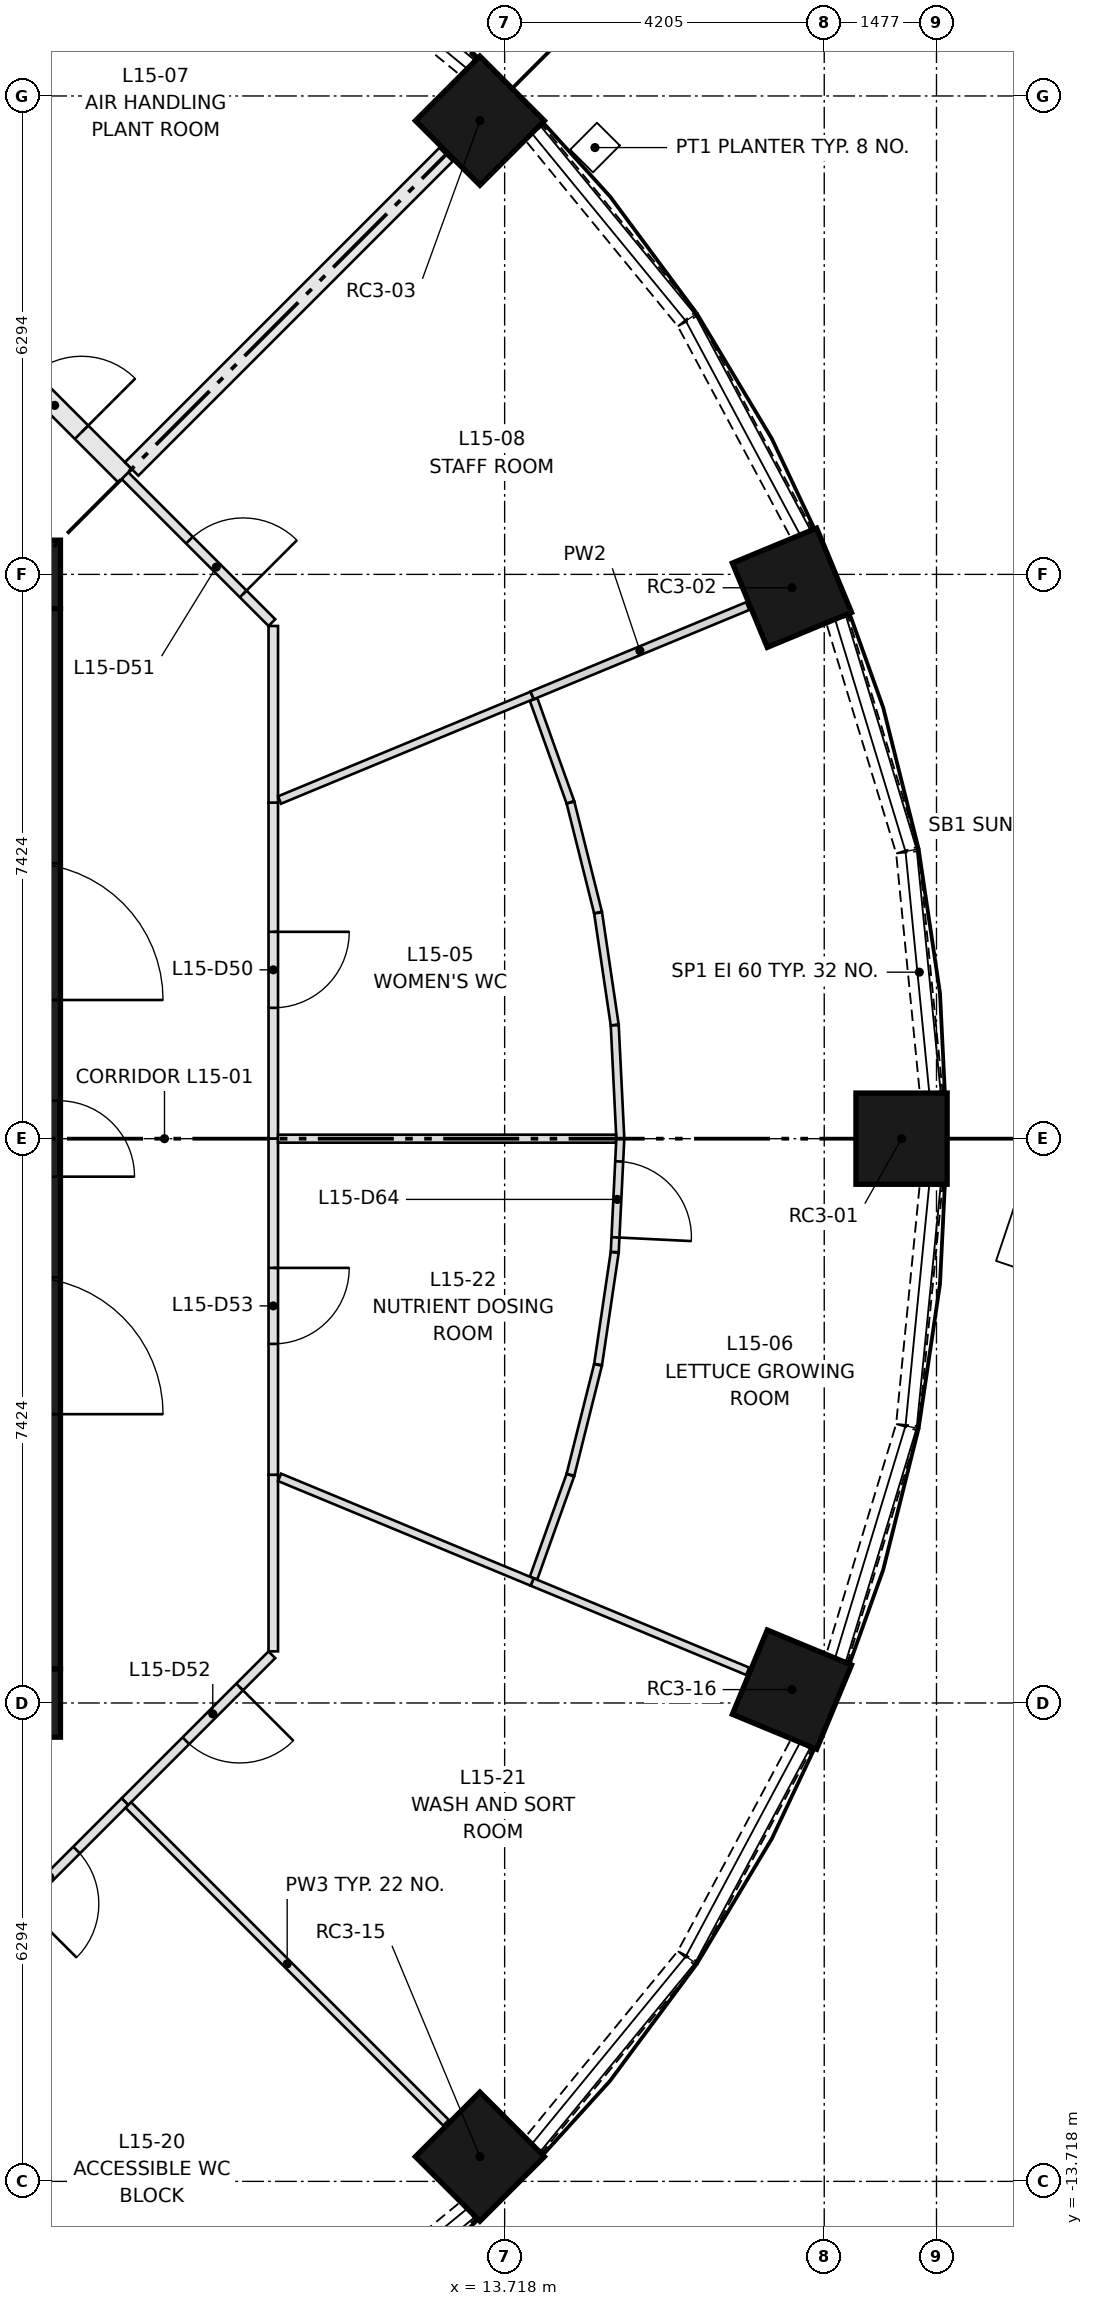
"""IFC4 building model, lengths in metres.
Left out: names, types, materials, properties, quantities, classifications, styles, units other than length and angle.
Written with IfcOpenShell. Run it as: python <this file> out.ifc"""

import sys

from ifc_helpers import new_model, si_unit, direction, frame, frame_2d, origin, origin_2d, place, context, subcontext, project, spatial, rectangle, extrude, element, fill, save


model = new_model("IFC4")
c1 = context("Model", 3, precision=1e-05, world=origin(), true_north=direction((0.0, 1.0)))
c2 = subcontext(c1, "Body", "Model", "MODEL_VIEW")
j1 = project(units=[si_unit("LENGTHUNIT", "METRE"), si_unit("PLANEANGLEUNIT", "RADIAN")], contexts=[c1])
p1 = place(None, origin())
s1 = spatial("IfcSite", under=j1, at=p1, CompositionType="ELEMENT")
p2 = place(p1, origin())
s2 = spatial("IfcBuilding", under=s1, at=p2, CompositionType="ELEMENT")
p3 = place(p2, frame((0.0, 0.0, 59.05)))
s3 = spatial("IfcBuildingStorey", under=s2, at=p3, CompositionType="ELEMENT", Elevation=59.05)
for number, where, z_axis, x_axis in (
    (1, (18.94, 0.0, 0.0), (0.0, 0.0, 1.0), (1.0, 0.0, 0.0)),
    (2, (17.498, 7.248, 0.0), (0.0, 0.0, 1.0), (0.924, 0.383, 0.0)),
    (3, (13.393, 13.393, 0.0), (0.0, 0.0, 1.0), (0.707, 0.707, 0.0)),
    (4, (13.393, -13.393, 0.0), (0.0, 0.0, 1.0), (0.707, -0.707, 0.0)),
    (5, (17.498, -7.248, 0.0), (0.0, 0.0, 1.0), (0.924, -0.383, 0.0)),
):
    element("IfcColumn", number, at=place(p3, frame(where, z_axis=z_axis, x_axis=x_axis)), inside=s3, PredefinedType="COLUMN", context=c2, shape_type="SweptSolid", body=[
        extrude(rectangle(XDim=1.2, YDim=1.2, at=origin_2d()), origin(), (0.0, 0.0, 1.0), 3.65),
    ])
for number, where, z_axis, x_axis in (
    (6, (-7.874, -7.424, 0.0), (0.0, 0.0, 1.0), (1.0, 0.0, 0.0)),
    (7, (-7.874, 7.424, 0.0), (0.0, 0.0, 1.0), (1.0, 0.0, 0.0)),
):
    element("IfcWall", number, at=place(p3, frame(where, z_axis=z_axis, x_axis=x_axis)), inside=s3, PredefinedType="SHEAR", context=c2, shape_type="SweptSolid", body=[
        extrude(rectangle(XDim=15.748, YDim=0.9, at=frame_2d((7.874, 0.0))), origin(), (0.0, 0.0, 1.0), 3.65),
    ])
p4 = place(p3, frame((7.424, -6.974, 0.0), z_axis=(0.0, 0.0, 1.0), x_axis=(0.0, 1.0, 0.0)))
e8 = element("IfcWall", 8, at=p4, inside=s3, PredefinedType="SHEAR", context=c2, shape_type="SweptSolid", body=[
    extrude(rectangle(XDim=13.948, YDim=0.9, at=frame_2d((6.974, 0.0))), origin(), (0.0, 0.0, 1.0), 3.65),
])
p5 = place(p4, frame((6.474, 0.0, 0.0)))
e9 = element("IfcOpeningElement", 9, at=p5, cuts=e8, PredefinedType="OPENING", context=c2, shape_type="SweptSolid", body=[
    extrude(rectangle(XDim=1.0, YDim=2.1, at=frame_2d((0.5, 1.05))), frame((0.0, 0.46, 0.0), z_axis=(0.0, -1.0, 0.0), x_axis=(1.0, 0.0, 0.0)), (0.0, 0.0, 1.0), 0.92),
])
p6 = place(p4, frame((3.35, 0.0, 0.0)))
e10 = element("IfcOpeningElement", 10, at=p6, cuts=e8, PredefinedType="OPENING", context=c2, shape_type="SweptSolid", body=[
    extrude(rectangle(XDim=1.8, YDim=2.1, at=frame_2d((0.9, 1.05))), frame((0.0, 0.46, 0.0), z_axis=(0.0, -1.0, 0.0), x_axis=(1.0, 0.0, 0.0)), (0.0, 0.0, 1.0), 0.92),
])
p7 = place(p4, frame((8.799, 0.0, 0.0)))
e11 = element("IfcOpeningElement", 11, at=p7, cuts=e8, PredefinedType="OPENING", context=c2, shape_type="SweptSolid", body=[
    extrude(rectangle(XDim=1.8, YDim=2.1, at=frame_2d((0.9, 1.05))), frame((0.0, 0.46, 0.0), z_axis=(0.0, -1.0, 0.0), x_axis=(1.0, 0.0, 0.0)), (0.0, 0.0, 1.0), 0.92),
])
p8 = place(p3, frame((19.33, 0.613, 0.0), z_axis=(0.0, 0.0, 1.0), x_axis=(-0.098100807709, 0.995176482603, 0.0)))
e12 = element("IfcWall", 12, at=p8, inside=s3, PredefinedType="SOLIDWALL", context=c2, shape_type="SweptSolid", body=[
    extrude(rectangle(XDim=3.171, YDim=0.3, at=frame_2d((1.585, 0.0))), origin(), (0.0, 0.0, 1.0), 0.9),
])
p9 = place(p3, frame((19.013, 3.797, 0.0), z_axis=(0.0, 0.0, 1.0), x_axis=(-0.290456409527, 0.956888224489, 0.0)))
e13 = element("IfcWall", 13, at=p9, inside=s3, PredefinedType="SOLIDWALL", context=c2, shape_type="SweptSolid", body=[
    extrude(rectangle(XDim=3.169, YDim=0.3, at=frame_2d((1.584, 0.0))), origin(), (0.0, 0.0, 1.0), 0.9),
])
p10 = place(p3, frame((17.623, 7.963, 0.0), z_axis=(0.0, 0.0, 1.0), x_axis=(-0.47123575379, 0.882007292685, 0.0)))
e14 = element("IfcWall", 14, at=p10, inside=s3, PredefinedType="SOLIDWALL", context=c2, shape_type="SweptSolid", body=[
    extrude(rectangle(XDim=3.17, YDim=0.3, at=frame_2d((1.585, 0.0))), origin(), (0.0, 0.0, 1.0), 0.9),
])
for number, where, z_axis, x_axis in (
    (15, (16.113, 10.784, 0.0), (0.0, 0.0, 1.0), (-0.634, 0.773, 0.0)),
    (16, (13.234, 14.103, 0.0), (0.0, 0.0, 1.0), (-0.773, 0.634, 0.0)),
    (17, (10.784, -16.113, 0.0), (0.0, 0.0, 1.0), (0.773, 0.634, 0.0)),
    (18, (14.103, -13.234, 0.0), (0.0, 0.0, 1.0), (0.634, 0.773, 0.0)),
):
    element("IfcWall", number, at=place(p3, frame(where, z_axis=z_axis, x_axis=x_axis)), inside=s3, PredefinedType="SOLIDWALL", context=c2, shape_type="SweptSolid", body=[
        extrude(rectangle(XDim=3.169, YDim=0.3, at=frame_2d((1.585, 0.0))), origin(), (0.0, 0.0, 1.0), 0.9),
    ])
p11 = place(p3, frame((16.129, -10.759, 0.0), z_axis=(0.0, 0.0, 1.0), x_axis=(0.47123575379, 0.882007292685, 0.0)))
e19 = element("IfcWall", 19, at=p11, inside=s3, PredefinedType="SOLIDWALL", context=c2, shape_type="SweptSolid", body=[
    extrude(rectangle(XDim=3.17, YDim=0.3, at=frame_2d((1.585, 0.0))), origin(), (0.0, 0.0, 1.0), 0.9),
])
p12 = place(p3, frame((18.092, -6.83, 0.0), z_axis=(0.0, 0.0, 1.0), x_axis=(0.290456409527, 0.956888224489, 0.0)))
e20 = element("IfcWall", 20, at=p12, inside=s3, PredefinedType="SOLIDWALL", context=c2, shape_type="SweptSolid", body=[
    extrude(rectangle(XDim=3.169, YDim=0.3, at=frame_2d((1.584, 0.0))), origin(), (0.0, 0.0, 1.0), 0.9),
])
p13 = place(p3, frame((19.019, -3.768, 0.0), z_axis=(0.0, 0.0, 1.0), x_axis=(0.098100807709, 0.995176482603, 0.0)))
e21 = element("IfcWall", 21, at=p13, inside=s3, PredefinedType="SOLIDWALL", context=c2, shape_type="SweptSolid", body=[
    extrude(rectangle(XDim=3.171, YDim=0.3, at=frame_2d((1.585, 0.0))), origin(), (0.0, 0.0, 1.0), 0.9),
])
p14 = place(p3, frame((10.674, 4.421, 0.0), z_axis=(0.0, 0.0, 1.0), x_axis=(0.0, -1.0, 0.0)))
e22 = element("IfcWall", 22, at=p14, inside=s3, PredefinedType="PARTITIONING", context=c2, shape_type="SweptSolid", body=[
    extrude(rectangle(XDim=4.421, YDim=0.125, at=frame_2d((2.211, 0.0))), origin(), (0.0, 0.0, 1.0), 3.3),
])
p15 = place(p14, frame((1.7, 0.0, 0.0)))
e23 = element("IfcOpeningElement", 23, at=p15, cuts=e22, PredefinedType="OPENING", context=c2, shape_type="SweptSolid", body=[
    extrude(rectangle(XDim=1.0, YDim=2.1, at=frame_2d((0.5, 1.05))), frame((0.0, 0.073, 0.0), z_axis=(0.0, -1.0, 0.0), x_axis=(1.0, 0.0, 0.0)), (0.0, 0.0, 1.0), 0.145),
])
p16 = place(p3, frame((8.722, 8.722, 0.0), z_axis=(0.0, 0.0, 1.0), x_axis=(0.707151428813, -0.707062130741, 0.0)))
e24 = element("IfcWall", 24, at=p16, inside=s3, PredefinedType="PARTITIONING", context=c2, shape_type="SweptSolid", body=[
    extrude(rectangle(XDim=2.734, YDim=0.125, at=frame_2d((1.367, 0.0))), origin(), (0.0, 0.0, 1.0), 3.3),
])
p17 = place(p16, frame((1.2, 0.0, 0.0)))
e25 = element("IfcOpeningElement", 25, at=p17, cuts=e24, PredefinedType="OPENING", context=c2, shape_type="SweptSolid", body=[
    extrude(rectangle(XDim=1.0, YDim=2.1, at=frame_2d((0.5, 1.05))), frame((0.0, 0.073, 0.0), z_axis=(0.0, -1.0, 0.0), x_axis=(1.0, 0.0, 0.0)), (0.0, 0.0, 1.0), 0.145),
])
p18 = place(p3, frame((10.674, 6.745, 0.0), z_axis=(0.0, 0.0, 1.0), x_axis=(0.0, -1.0, 0.0)))
e26 = element("IfcWall", 26, at=p18, inside=s3, PredefinedType="PARTITIONING", context=c2, shape_type="SweptSolid", body=[
    extrude(rectangle(XDim=2.324, YDim=0.125, at=frame_2d((1.162, 0.0))), origin(), (0.0, 0.0, 1.0), 3.3),
])
p19 = place(p3, frame((10.656, -6.789, 0.0), z_axis=(0.0, 0.0, 1.0), x_axis=(-0.707151428813, -0.707062130741, 0.0)))
e27 = element("IfcWall", 27, at=p19, inside=s3, PredefinedType="PARTITIONING", context=c2, shape_type="SweptSolid", body=[
    extrude(rectangle(XDim=2.734, YDim=0.125, at=frame_2d((1.367, 0.0))), origin(), (0.0, 0.0, 1.0), 3.3),
])
p20 = place(p19, frame((0.6, 0.0, 0.0)))
e28 = element("IfcOpeningElement", 28, at=p20, cuts=e27, PredefinedType="OPENING", context=c2, shape_type="SweptSolid", body=[
    extrude(rectangle(XDim=1.0, YDim=2.1, at=frame_2d((0.5, 1.05))), frame((0.0, 0.073, 0.0), z_axis=(0.0, -1.0, 0.0), x_axis=(1.0, 0.0, 0.0)), (0.0, 0.0, 1.0), 0.145),
])
p21 = place(p3, frame((10.674, -4.421, 0.0), z_axis=(0.0, 0.0, 1.0), x_axis=(0.0, -1.0, 0.0)))
e29 = element("IfcWall", 29, at=p21, inside=s3, PredefinedType="PARTITIONING", context=c2, shape_type="SweptSolid", body=[
    extrude(rectangle(XDim=2.324, YDim=0.125, at=frame_2d((1.162, 0.0))), origin(), (0.0, 0.0, 1.0), 3.3),
])
p22 = place(p3, frame((10.674, 0.0, 0.0), z_axis=(0.0, 0.0, 1.0), x_axis=(0.0, -1.0, 0.0)))
e30 = element("IfcWall", 30, at=p22, inside=s3, PredefinedType="PARTITIONING", context=c2, shape_type="SweptSolid", body=[
    extrude(rectangle(XDim=4.421, YDim=0.125, at=frame_2d((2.211, 0.0))), origin(), (0.0, 0.0, 1.0), 3.3),
])
p23 = place(p22, frame((1.7, 0.0, 0.0)))
e31 = element("IfcOpeningElement", 31, at=p23, cuts=e30, PredefinedType="OPENING", context=c2, shape_type="SweptSolid", body=[
    extrude(rectangle(XDim=1.0, YDim=2.1, at=frame_2d((0.5, 1.05))), frame((0.0, 0.073, 0.0), z_axis=(0.0, -1.0, 0.0), x_axis=(1.0, 0.0, 0.0)), (0.0, 0.0, 1.0), 0.145),
])
p24 = place(p3, frame((6.808, 10.637, 0.0), z_axis=(0.0, 0.0, 1.0), x_axis=(0.707061703777, -0.707151855722, 0.0)))
e32 = element("IfcWall", 32, at=p24, inside=s3, PredefinedType="PARTITIONING", context=c2, shape_type="SweptSolid", body=[
    extrude(rectangle(XDim=2.708, YDim=0.25, at=frame_2d((1.354, 0.0))), origin(), (0.0, 0.0, 1.0), 3.3),
])
p25 = place(p24, frame((0.9, 0.0, 0.0)))
e33 = element("IfcOpeningElement", 33, at=p25, cuts=e32, PredefinedType="OPENING", context=c2, shape_type="SweptSolid", body=[
    extrude(rectangle(XDim=1.0, YDim=2.1, at=frame_2d((0.5, 1.05))), frame((0.0, 0.135, 0.0), z_axis=(0.0, -1.0, 0.0), x_axis=(1.0, 0.0, 0.0)), (0.0, 0.0, 1.0), 0.27),
])
p26 = place(p3, frame((8.722, -8.722, 0.0), z_axis=(0.0, 0.0, 1.0), x_axis=(-0.707062130741, -0.707151428813, 0.0)))
e34 = element("IfcWall", 34, at=p26, inside=s3, PredefinedType="PARTITIONING", context=c2, shape_type="SweptSolid", body=[
    extrude(rectangle(XDim=2.734, YDim=0.125, at=frame_2d((1.367, 0.0))), origin(), (0.0, 0.0, 1.0), 3.3),
])
p27 = place(p26, frame((0.9, 0.0, 0.0)))
e35 = element("IfcOpeningElement", 35, at=p27, cuts=e34, PredefinedType="OPENING", context=c2, shape_type="SweptSolid", body=[
    extrude(rectangle(XDim=1.0, YDim=2.1, at=frame_2d((0.5, 1.05))), frame((0.0, 0.073, 0.0), z_axis=(0.0, -1.0, 0.0), x_axis=(1.0, 0.0, 0.0)), (0.0, 0.0, 1.0), 0.145),
])
p28 = place(p3, frame((14.099, 5.778, 0.0), z_axis=(0.0, 0.0, 1.0), x_axis=(0.336918127064, -0.941533948222, 0.0)))
e36 = element("IfcWall", 36, at=p28, inside=s3, PredefinedType="PARTITIONING", context=c2, shape_type="SweptSolid", body=[
    extrude(rectangle(XDim=1.436, YDim=0.105, at=frame_2d((0.718, 0.0))), origin(), (0.0, 0.0, 1.0), 3.3),
])
for number, where, z_axis, x_axis in (
    (37, (14.584, 4.421, 0.0), (0.0, 0.0, 1.0), (0.243, -0.97, 0.0)),
    (38, (14.948, 2.971, 0.0), (0.0, 0.0, 1.0), (0.147, -0.989, 0.0)),
):
    element("IfcWall", number, at=place(p3, frame(where, z_axis=z_axis, x_axis=x_axis)), inside=s3, PredefinedType="PARTITIONING", context=c2, shape_type="SweptSolid", body=[
        extrude(rectangle(XDim=1.49, YDim=0.105, at=frame_2d((0.745, 0.0))), origin(), (0.0, 0.0, 1.0), 3.3),
    ])
p29 = place(p3, frame((15.167, 1.491, 0.0), z_axis=(0.0, 0.0, 1.0), x_axis=(0.049056777577, -0.998795991469, 0.0)))
e39 = element("IfcWall", 39, at=p29, inside=s3, PredefinedType="PARTITIONING", context=c2, shape_type="SweptSolid", body=[
    extrude(rectangle(XDim=1.493, YDim=0.105, at=frame_2d((0.747, 0.0))), origin(), (0.0, 0.0, 1.0), 3.3),
])
p30 = place(p3, frame((10.757, 4.456, 0.0), z_axis=(0.0, 0.0, 1.0), x_axis=(0.923886131731, 0.382667500051, 0.0)))
e40 = element("IfcWall", 40, at=p30, inside=s3, PredefinedType="PARTITIONING", context=c2, shape_type="SweptSolid", body=[
    extrude(rectangle(XDim=3.597, YDim=0.105, at=frame_2d((1.798, 0.0))), origin(), (0.0, 0.0, 1.0), 3.3),
])
p31 = place(p3, frame((15.185, 0.0, 0.0), z_axis=(0.0, 0.0, 1.0), x_axis=(-1.0, 0.0, 0.0)))
e41 = element("IfcWall", 41, at=p31, inside=s3, PredefinedType="PARTITIONING", context=c2, shape_type="SweptSolid", body=[
    extrude(rectangle(XDim=4.448, YDim=0.105, at=frame_2d((2.224, 0.0))), origin(), (0.0, 0.0, 1.0), 3.3),
])
p32 = place(p3, frame((14.08, 5.832, 0.0), z_axis=(0.0, 0.0, 1.0), x_axis=(0.923860783753, 0.382728692736, 0.0)))
e42 = element("IfcWall", 42, at=p32, inside=s3, PredefinedType="PARTITIONING", context=c2, shape_type="SweptSolid", body=[
    extrude(rectangle(XDim=3.07, YDim=0.11, at=frame_2d((1.535, 0.0))), origin(), (0.0, 0.0, 1.0), 3.3),
])
p33 = place(p3, frame((16.916, -7.007, 0.0), z_axis=(0.0, 0.0, 1.0), x_axis=(-0.923860783753, 0.382728692736, 0.0)))
e43 = element("IfcWall", 43, at=p33, inside=s3, PredefinedType="PARTITIONING", context=c2, shape_type="SweptSolid", body=[
    extrude(rectangle(XDim=3.07, YDim=0.105, at=frame_2d((1.535, 0.0))), origin(), (0.0, 0.0, 1.0), 3.3),
])
p34 = place(p3, frame((14.098, -5.78, 0.0), z_axis=(0.0, 0.0, 1.0), x_axis=(0.336981574949, 0.941511241646, 0.0)))
e44 = element("IfcWall", 44, at=p34, inside=s3, PredefinedType="PARTITIONING", context=c2, shape_type="SweptSolid", body=[
    extrude(rectangle(XDim=1.438, YDim=0.105, at=frame_2d((0.719, 0.0))), origin(), (0.0, 0.0, 1.0), 3.3),
])
for number, where, z_axis, x_axis in (
    (45, (14.584, -4.421, 0.0), (0.0, 0.0, 1.0), (0.243, 0.97, 0.0)),
    (46, (14.948, -2.971, 0.0), (0.0, 0.0, 1.0), (0.147, 0.989, 0.0)),
):
    element("IfcWall", number, at=place(p3, frame(where, z_axis=z_axis, x_axis=x_axis)), inside=s3, PredefinedType="PARTITIONING", context=c2, shape_type="SweptSolid", body=[
        extrude(rectangle(XDim=1.49, YDim=0.105, at=frame_2d((0.745, 0.0))), origin(), (0.0, 0.0, 1.0), 3.3),
    ])
p35 = place(p3, frame((15.24, 0.0, 0.0), z_axis=(0.0, 0.0, 1.0), x_axis=(-0.049056777577, -0.998795991469, 0.0)))
e47 = element("IfcWall", 47, at=p35, inside=s3, PredefinedType="PARTITIONING", context=c2, shape_type="SweptSolid", body=[
    extrude(rectangle(XDim=1.493, YDim=0.105, at=frame_2d((0.747, 0.0))), origin(), (0.0, 0.0, 1.0), 3.3),
])
p36 = place(p35, frame((0.3, 0.0, 0.0)))
e48 = element("IfcOpeningElement", 48, at=p36, cuts=e47, PredefinedType="OPENING", context=c2, shape_type="SweptSolid", body=[
    extrude(rectangle(XDim=1.0, YDim=2.1, at=frame_2d((0.5, 1.05))), frame((0.0, 0.062, 0.0), z_axis=(0.0, -1.0, 0.0), x_axis=(1.0, 0.0, 0.0)), (0.0, 0.0, 1.0), 0.125),
])
p37 = place(p3, frame((12.947, 12.947, 0.0), z_axis=(0.0, 0.0, 1.0), x_axis=(-0.707106781187, -0.707106781187, 0.0)))
e49 = element("IfcWall", 49, at=p37, inside=s3, PredefinedType="PARTITIONING", context=c2, shape_type="SweptSolid", body=[
    extrude(rectangle(XDim=5.85, YDim=0.25, at=frame_2d((2.925, 0.0))), origin(), (0.0, 0.0, 1.0), 3.3),
])
p38 = place(p3, frame((8.767, -8.767, 0.0), z_axis=(0.0, 0.0, 1.0), x_axis=(0.707106781187, -0.707106781187, 0.0)))
e50 = element("IfcWall", 50, at=p38, inside=s3, PredefinedType="PARTITIONING", context=c2, shape_type="SweptSolid", body=[
    extrude(rectangle(XDim=5.912, YDim=0.105, at=frame_2d((2.956, 0.0))), origin(), (0.0, 0.0, 1.0), 3.3),
])
p39 = place(p3, frame((10.757, -4.456, 0.0), z_axis=(0.0, 0.0, 1.0), x_axis=(0.923886131731, -0.382667500051, 0.0)))
e51 = element("IfcWall", 51, at=p39, inside=s3, PredefinedType="PARTITIONING", context=c2, shape_type="SweptSolid", body=[
    extrude(rectangle(XDim=3.597, YDim=0.105, at=frame_2d((1.798, 0.0))), origin(), (0.0, 0.0, 1.0), 3.3),
])
p40 = place(p5, frame((1.0, 0.0, 0.0), z_axis=(0.0, 0.0, 1.0), x_axis=(-1.0, 0.0, 0.0)))
e52 = element("IfcDoor", 52, at=p40, inside=s3, OperationType="SINGLE_SWING_LEFT", PredefinedType="DOOR", context=c2, shape_type="SweptSolid", body=[
    extrude(rectangle(XDim=1.0, YDim=2.1, at=frame_2d((0.5, 1.05))), frame((0.0, 0.45, 0.0), z_axis=(0.0, -1.0, 0.0), x_axis=(1.0, 0.0, 0.0)), (0.0, 0.0, 1.0), 0.05),
])
fill(e9, e52)
p41 = place(p15, origin())
e53 = element("IfcDoor", 53, at=p41, inside=s3, OperationType="SINGLE_SWING_LEFT", PredefinedType="DOOR", context=c2, shape_type="SweptSolid", body=[
    extrude(rectangle(XDim=1.0, YDim=2.1, at=frame_2d((0.5, 1.05))), frame((0.0, 0.025, 0.0), z_axis=(0.0, -1.0, 0.0), x_axis=(1.0, 0.0, 0.0)), (0.0, 0.0, 1.0), 0.05),
])
fill(e23, e53)
p42 = place(p17, origin())
e54 = element("IfcDoor", 54, at=p42, inside=s3, OperationType="SINGLE_SWING_RIGHT", PredefinedType="DOOR", context=c2, shape_type="SweptSolid", body=[
    extrude(rectangle(XDim=1.0, YDim=2.1, at=frame_2d((0.5, 1.05))), frame((0.0, 0.025, 0.0), z_axis=(0.0, -1.0, 0.0), x_axis=(1.0, 0.0, 0.0)), (0.0, 0.0, 1.0), 0.05),
])
fill(e25, e54)
p43 = place(p20, origin())
e55 = element("IfcDoor", 55, at=p43, inside=s3, OperationType="SINGLE_SWING_LEFT", PredefinedType="DOOR", context=c2, shape_type="SweptSolid", body=[
    extrude(rectangle(XDim=1.0, YDim=2.1, at=frame_2d((0.5, 1.05))), frame((0.0, 0.025, 0.0), z_axis=(0.0, -1.0, 0.0), x_axis=(1.0, 0.0, 0.0)), (0.0, 0.0, 1.0), 0.05),
])
fill(e28, e55)
p44 = place(p23, origin())
e56 = element("IfcDoor", 56, at=p44, inside=s3, OperationType="SINGLE_SWING_LEFT", PredefinedType="DOOR", context=c2, shape_type="SweptSolid", body=[
    extrude(rectangle(XDim=1.0, YDim=2.1, at=frame_2d((0.5, 1.05))), frame((0.0, 0.025, 0.0), z_axis=(0.0, -1.0, 0.0), x_axis=(1.0, 0.0, 0.0)), (0.0, 0.0, 1.0), 0.05),
])
fill(e31, e56)
p45 = place(p25, origin())
e57 = element("IfcDoor", 57, at=p45, inside=s3, OperationType="SINGLE_SWING_RIGHT", PredefinedType="DOOR", context=c2, shape_type="SweptSolid", body=[
    extrude(rectangle(XDim=1.0, YDim=2.1, at=frame_2d((0.5, 1.05))), frame((0.0, 0.025, 0.0), z_axis=(0.0, -1.0, 0.0), x_axis=(1.0, 0.0, 0.0)), (0.0, 0.0, 1.0), 0.05),
])
fill(e33, e57)
p46 = place(p27, origin())
e58 = element("IfcDoor", 58, at=p46, inside=s3, OperationType="SINGLE_SWING_RIGHT", PredefinedType="DOOR", context=c2, shape_type="SweptSolid", body=[
    extrude(rectangle(XDim=1.0, YDim=2.1, at=frame_2d((0.5, 1.05))), frame((0.0, 0.025, 0.0), z_axis=(0.0, -1.0, 0.0), x_axis=(1.0, 0.0, 0.0)), (0.0, 0.0, 1.0), 0.05),
])
fill(e35, e58)
p47 = place(p36, origin())
e59 = element("IfcDoor", 59, at=p47, inside=s3, OperationType="SINGLE_SWING_RIGHT", PredefinedType="DOOR", context=c2, shape_type="SweptSolid", body=[
    extrude(rectangle(XDim=1.0, YDim=2.1, at=frame_2d((0.5, 1.05))), frame((0.0, 0.025, 0.0), z_axis=(0.0, -1.0, 0.0), x_axis=(1.0, 0.0, 0.0)), (0.0, 0.0, 1.0), 0.05),
])
fill(e48, e59)
save(model, sys.argv[1])
